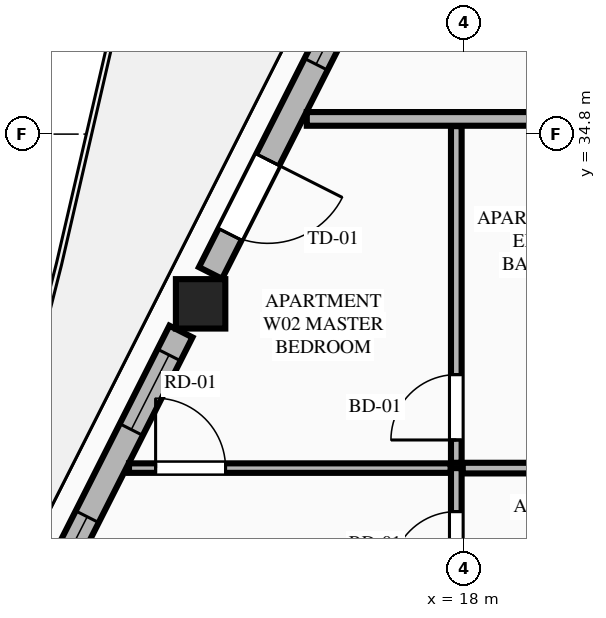
"""IFC4 building model, lengths in metres.
Left out: names, types, materials, properties, quantities, classifications, styles, units other than length and angle.
Written with IfcOpenShell. Run it as: python <this file> out.ifc"""

import sys

from ifc_helpers import new_model, si_unit, direction, frame, frame_2d, origin, origin_2d, place, context, subcontext, project, spatial, rectangle, extrude, element, fill, save


model = new_model("IFC4")
c1 = context("Model", 3, precision=1e-05, world=origin(), true_north=direction((0.0, 1.0)))
c2 = subcontext(c1, "Body", "Model", "MODEL_VIEW")
j1 = project(units=[si_unit("LENGTHUNIT", "METRE"), si_unit("PLANEANGLEUNIT", "RADIAN")], contexts=[c1])
p1 = place(None, origin())
s1 = spatial("IfcSite", under=j1, at=p1, CompositionType="ELEMENT")
p2 = place(p1, origin())
s2 = spatial("IfcBuilding", under=s1, at=p2, CompositionType="ELEMENT")
p3 = place(p2, frame((0.0, 0.0, 259.85)))
s3 = spatial("IfcBuildingStorey", under=s2, at=p3, CompositionType="ELEMENT", Elevation=259.85)
p4 = place(p3, frame((14.536, 32.567, 0.0), z_axis=(0.0, 0.0, 1.0), x_axis=(1.0, 0.0, 0.0)))
e1 = element("IfcColumn", 1, at=p4, inside=s3, PredefinedType="COLUMN", context=c2, shape_type="SweptSolid", body=[
    extrude(rectangle(XDim=0.65, YDim=0.65, at=origin_2d()), origin(), (0.0, 0.0, 1.0), 3.65),
])
p5 = place(p3, frame((16.798, 37.187, 0.0), z_axis=(0.0, 0.0, 1.0), x_axis=(-0.451447516904, -0.892297674255, 0.0)))
e2 = element("IfcWall", 2, at=p5, inside=s3, PredefinedType="STANDARD", context=c2, shape_type="SweptSolid", body=[
    extrude(rectangle(XDim=4.723, YDim=0.34, at=frame_2d((2.361, 0.0))), origin(), (0.0, 0.0, 1.0), 2.983),
])
p6 = place(p5, frame((3.053, 0.0, 0.0)))
e3 = element("IfcOpeningElement", 3, at=p6, cuts=e2, PredefinedType="OPENING", context=c2, shape_type="SweptSolid", body=[
    extrude(rectangle(XDim=1.1, YDim=2.25, at=frame_2d((0.55, 1.125))), frame((0.0, 0.18, 0.0), z_axis=(0.0, -1.0, 0.0), x_axis=(1.0, 0.0, 0.0)), (0.0, 0.0, 1.0), 0.36),
])
p7 = place(p5, frame((0.546, 0.0, 0.75)))
e4 = element("IfcOpeningElement", 4, at=p7, cuts=e2, PredefinedType="OPENING", context=c2, shape_type="SweptSolid", body=[
    extrude(rectangle(XDim=1.1, YDim=2.0, at=frame_2d((0.55, 1.0))), frame((0.0, 0.18, 0.0), z_axis=(0.0, -1.0, 0.0), x_axis=(1.0, 0.0, 0.0)), (0.0, 0.0, 1.0), 0.36),
])
p8 = place(p3, frame((14.277, 32.203, 0.0), z_axis=(0.0, 0.0, 1.0), x_axis=(-0.45147697324, -0.892282770558, 0.0)))
e5 = element("IfcWall", 5, at=p8, inside=s3, PredefinedType="STANDARD", context=c2, shape_type="SweptSolid", body=[
    extrude(rectangle(XDim=4.53, YDim=0.34, at=frame_2d((2.265, 0.0))), origin(), (0.0, 0.0, 1.0), 2.983),
])
p9 = place(p8, frame((0.346, 0.0, 0.75)))
e6 = element("IfcOpeningElement", 6, at=p9, cuts=e5, PredefinedType="OPENING", context=c2, shape_type="SweptSolid", body=[
    extrude(rectangle(XDim=1.1, YDim=2.0, at=frame_2d((0.55, 1.0))), frame((0.0, 0.18, 0.0), z_axis=(0.0, -1.0, 0.0), x_axis=(1.0, 0.0, 0.0)), (0.0, 0.0, 1.0), 0.36),
])
p10 = place(p8, frame((2.731, 0.0, 0.75)))
e7 = element("IfcOpeningElement", 7, at=p10, cuts=e5, PredefinedType="OPENING", context=c2, shape_type="SweptSolid", body=[
    extrude(rectangle(XDim=1.1, YDim=2.0, at=frame_2d((0.55, 1.0))), frame((0.0, 0.18, 0.0), z_axis=(0.0, -1.0, 0.0), x_axis=(1.0, 0.0, 0.0)), (0.0, 0.0, 1.0), 0.36),
])
p11 = place(p3, frame((15.933, 35.0, 0.0), z_axis=(0.0, 0.0, 1.0), x_axis=(1.0, 0.0, 0.0)))
e8 = element("IfcWall", 8, at=p11, inside=s3, PredefinedType="PARTITIONING", context=c2, shape_type="SweptSolid", body=[
    extrude(rectangle(XDim=4.322, YDim=0.18, at=frame_2d((2.161, 0.0))), origin(), (0.0, 0.0, 1.0), 3.45),
])
p12 = place(p3, frame((17.9, 27.006, 0.0), z_axis=(0.0, 0.0, 1.0), x_axis=(0.0, 1.0, 0.0)))
e9 = element("IfcWall", 9, at=p12, inside=s3, PredefinedType="PLUMBINGWALL", context=c2, shape_type="SweptSolid", body=[
    extrude(rectangle(XDim=3.4, YDim=0.14, at=frame_2d((1.7, 0.0))), origin(), (0.0, 0.0, 1.0), 3.45),
])
p13 = place(p12, frame((0.2, 0.0, 0.0)))
e10 = element("IfcOpeningElement", 10, at=p13, cuts=e9, PredefinedType="OPENING", context=c2, shape_type="SweptSolid", body=[
    extrude(rectangle(XDim=0.88, YDim=2.15, at=frame_2d((0.44, 1.075))), frame((0.0, 0.08, 0.0), z_axis=(0.0, -1.0, 0.0), x_axis=(1.0, 0.0, 0.0)), (0.0, 0.0, 1.0), 0.16),
])
p14 = place(p12, frame((1.968, 0.0, 0.0)))
e11 = element("IfcOpeningElement", 11, at=p14, cuts=e9, PredefinedType="OPENING", context=c2, shape_type="SweptSolid", body=[
    extrude(rectangle(XDim=0.86, YDim=2.1, at=frame_2d((0.43, 1.05))), frame((0.0, 0.08, 0.0), z_axis=(0.0, -1.0, 0.0), x_axis=(1.0, 0.0, 0.0)), (0.0, 0.0, 1.0), 0.16),
])
p15 = place(p3, frame((17.9, 30.476, 0.0), z_axis=(0.0, 0.0, 1.0), x_axis=(0.0, 1.0, 0.0)))
e12 = element("IfcWall", 12, at=p15, inside=s3, PredefinedType="PLUMBINGWALL", context=c2, shape_type="SweptSolid", body=[
    extrude(rectangle(XDim=4.429, YDim=0.14, at=frame_2d((2.214, 0.0))), origin(), (0.0, 0.0, 1.0), 3.45),
])
p16 = place(p15, frame((0.3, 0.0, 0.0)))
e13 = element("IfcOpeningElement", 13, at=p16, cuts=e12, PredefinedType="OPENING", context=c2, shape_type="SweptSolid", body=[
    extrude(rectangle(XDim=0.86, YDim=2.1, at=frame_2d((0.43, 1.05))), frame((0.0, 0.08, 0.0), z_axis=(0.0, -1.0, 0.0), x_axis=(1.0, 0.0, 0.0)), (0.0, 0.0, 1.0), 0.16),
])
p17 = place(p3, frame((17.985, 30.406, 0.0), z_axis=(0.0, 0.0, 1.0), x_axis=(1.0, 0.0, 0.0)))
e14 = element("IfcWall", 14, at=p17, inside=s3, PredefinedType="PLUMBINGWALL", context=c2, shape_type="SweptSolid", body=[
    extrude(rectangle(XDim=2.48, YDim=0.14, at=frame_2d((1.24, 0.0))), origin(), (0.0, 0.0, 1.0), 3.45),
])
p18 = place(p3, frame((13.594, 30.406, 0.0), z_axis=(0.0, 0.0, 1.0), x_axis=(1.0, 0.0, 0.0)))
e15 = element("IfcWall", 15, at=p18, inside=s3, PredefinedType="PARTITIONING", context=c2, shape_type="SweptSolid", body=[
    extrude(rectangle(XDim=4.231, YDim=0.125, at=frame_2d((2.115, 0.0))), origin(), (0.0, 0.0, 1.0), 3.45),
])
p19 = place(p18, frame((0.35, 0.0, 0.0)))
e16 = element("IfcOpeningElement", 16, at=p19, cuts=e15, PredefinedType="OPENING", context=c2, shape_type="SweptSolid", body=[
    extrude(rectangle(XDim=0.92, YDim=2.15, at=frame_2d((0.46, 1.075))), frame((0.0, 0.073, 0.0), z_axis=(0.0, -1.0, 0.0), x_axis=(1.0, 0.0, 0.0)), (0.0, 0.0, 1.0), 0.145),
])
p20 = place(p6, origin())
e17 = element("IfcDoor", 17, at=p20, inside=s3, OperationType="SINGLE_SWING_LEFT", PredefinedType="DOOR", context=c2, shape_type="SweptSolid", body=[
    extrude(rectangle(XDim=1.1, YDim=2.25, at=frame_2d((0.55, 1.125))), frame((0.0, 0.025, 0.0), z_axis=(0.0, -1.0, 0.0), x_axis=(1.0, 0.0, 0.0)), (0.0, 0.0, 1.0), 0.05),
])
fill(e3, e17)
p21 = place(p9, origin())
e18 = element("IfcWindow", 18, at=p21, inside=s3, PartitioningType="SINGLE_PANEL", PredefinedType="WINDOW", context=c2, shape_type="SweptSolid", body=[
    extrude(rectangle(XDim=1.1, YDim=2.0, at=frame_2d((0.55, 1.0))), frame((0.0, 0.03, 0.0), z_axis=(0.0, -1.0, 0.0), x_axis=(1.0, 0.0, 0.0)), (0.0, 0.0, 1.0), 0.06),
])
fill(e6, e18)
p22 = place(p14, origin())
e19 = element("IfcDoor", 19, at=p22, inside=s3, OperationType="SINGLE_SWING_LEFT", PredefinedType="DOOR", context=c2, shape_type="SweptSolid", body=[
    extrude(rectangle(XDim=0.86, YDim=2.1, at=frame_2d((0.43, 1.05))), frame((0.0, 0.025, 0.0), z_axis=(0.0, -1.0, 0.0), x_axis=(1.0, 0.0, 0.0)), (0.0, 0.0, 1.0), 0.05),
])
fill(e11, e19)
p23 = place(p16, origin())
e20 = element("IfcDoor", 20, at=p23, inside=s3, OperationType="SINGLE_SWING_LEFT", PredefinedType="DOOR", context=c2, shape_type="SweptSolid", body=[
    extrude(rectangle(XDim=0.86, YDim=2.1, at=frame_2d((0.43, 1.05))), frame((0.0, 0.025, 0.0), z_axis=(0.0, -1.0, 0.0), x_axis=(1.0, 0.0, 0.0)), (0.0, 0.0, 1.0), 0.05),
])
fill(e13, e20)
p24 = place(p19, origin())
e21 = element("IfcDoor", 21, at=p24, inside=s3, OperationType="SINGLE_SWING_LEFT", PredefinedType="DOOR", context=c2, shape_type="SweptSolid", body=[
    extrude(rectangle(XDim=0.92, YDim=2.15, at=frame_2d((0.46, 1.075))), frame((0.0, 0.025, 0.0), z_axis=(0.0, -1.0, 0.0), x_axis=(1.0, 0.0, 0.0)), (0.0, 0.0, 1.0), 0.05),
])
fill(e16, e21)
p25 = place(p7, origin())
e22 = element("IfcWindow", 22, at=p25, inside=s3, PartitioningType="SINGLE_PANEL", PredefinedType="WINDOW", context=c2, shape_type="SweptSolid", body=[
    extrude(rectangle(XDim=1.1, YDim=2.0, at=frame_2d((0.55, 1.0))), frame((0.0, 0.03, 0.0), z_axis=(0.0, -1.0, 0.0), x_axis=(1.0, 0.0, 0.0)), (0.0, 0.0, 1.0), 0.06),
])
fill(e4, e22)
p26 = place(p10, origin())
e23 = element("IfcWindow", 23, at=p26, inside=s3, PartitioningType="SINGLE_PANEL", PredefinedType="WINDOW", context=c2, shape_type="SweptSolid", body=[
    extrude(rectangle(XDim=1.1, YDim=2.0, at=frame_2d((0.55, 1.0))), frame((0.0, 0.03, 0.0), z_axis=(0.0, -1.0, 0.0), x_axis=(1.0, 0.0, 0.0)), (0.0, 0.0, 1.0), 0.06),
])
fill(e7, e23)
save(model, sys.argv[1])
